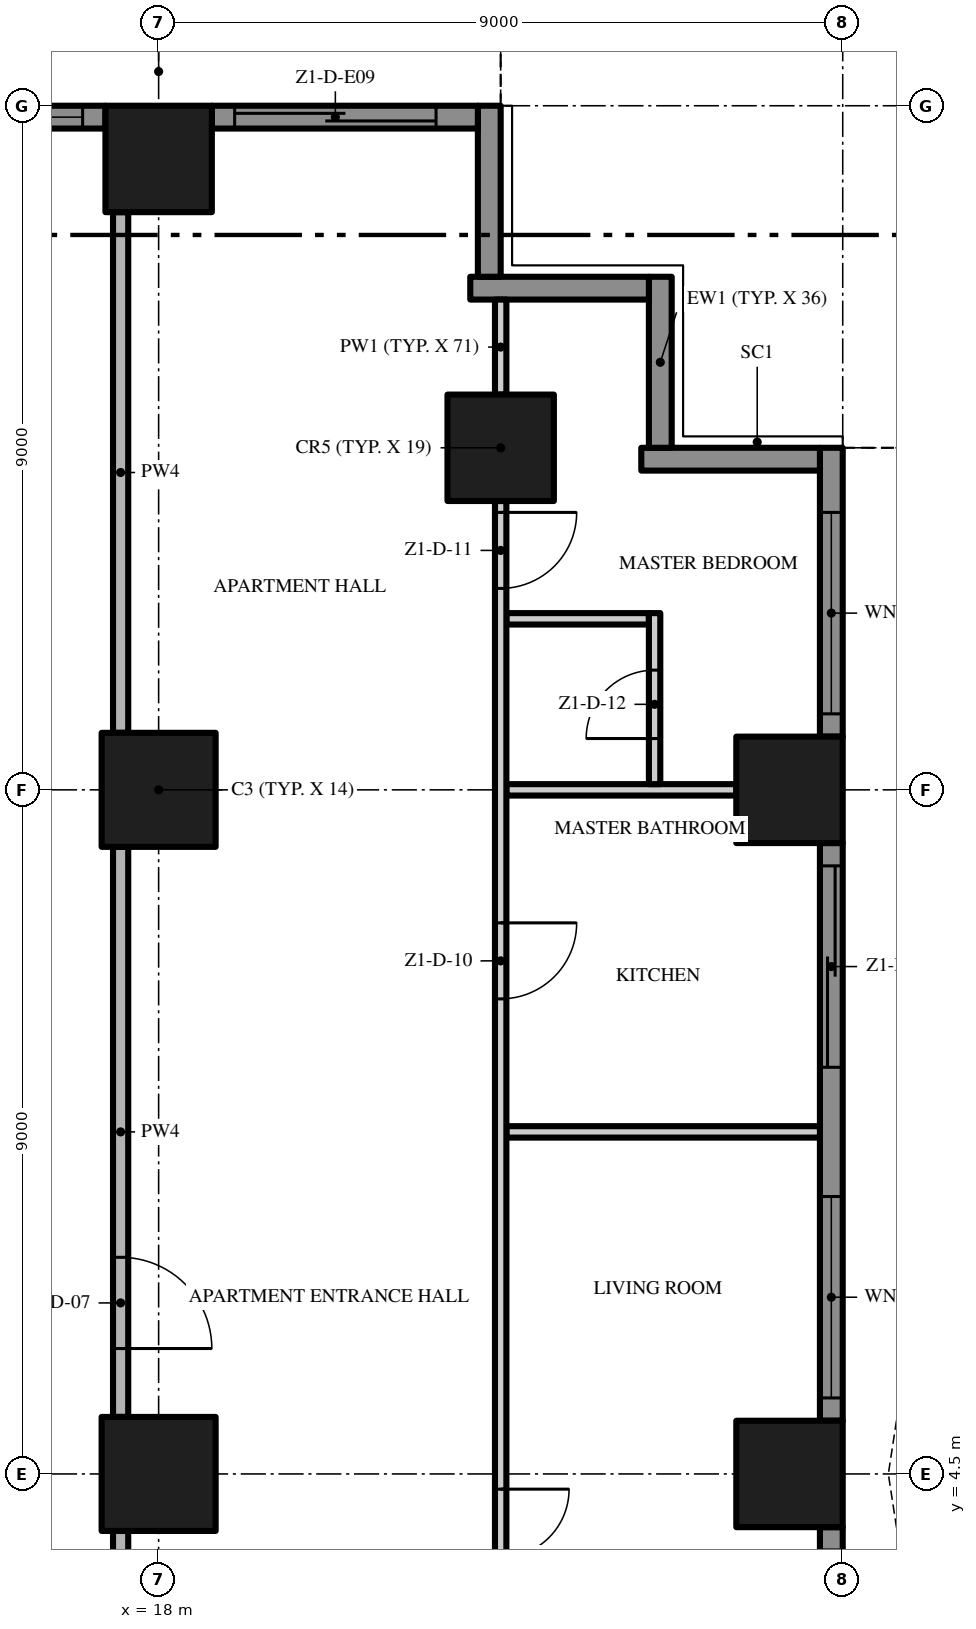
"""IFC4 building model, lengths in metres.
Left out: names, types, materials, properties, quantities, classifications, styles, units other than length and angle.
Written with IfcOpenShell. Run it as: python <this file> out.ifc"""

import sys

from ifc_helpers import new_model, si_unit, direction, frame, frame_2d, origin, origin_2d, place, context, subcontext, project, spatial, polyline, rectangle, outline, extrude, element, fill, save


model = new_model("IFC4")
c1 = context("Model", 3, precision=1e-05, world=origin(), true_north=direction((0.0, 1.0)))
c2 = subcontext(c1, "Body", "Model", "MODEL_VIEW")
j1 = project(units=[si_unit("LENGTHUNIT", "METRE"), si_unit("PLANEANGLEUNIT", "RADIAN")], contexts=[c1])
p1 = place(None, origin())
s1 = spatial("IfcSite", under=j1, at=p1, CompositionType="ELEMENT")
p2 = place(p1, origin())
s2 = spatial("IfcBuilding", under=s1, at=p2, CompositionType="ELEMENT")
p3 = place(p2, frame((0.0, 0.0, 53.0)))
s3 = spatial("IfcBuildingStorey", under=s2, at=p3, CompositionType="ELEMENT", Elevation=53.0)
p4 = place(p3, frame((18.0, 13.5, 0.0), z_axis=(0.0, 0.0, 1.0), x_axis=(1.0, 0.0, 0.0)))
e1 = element("IfcColumn", 1, at=p4, inside=s3, PredefinedType="COLUMN", context=c2, shape_type="SweptSolid", body=[
    extrude(rectangle(XDim=1.5, YDim=1.5, at=origin_2d()), origin(), (0.0, 0.0, 1.0), 3.5),
])
p5 = place(p3, frame((18.0, 21.8, 0.0), z_axis=(0.0, 0.0, 1.0), x_axis=(1.0, 0.0, 0.0)))
e2 = element("IfcColumn", 2, at=p5, inside=s3, PredefinedType="COLUMN", context=c2, shape_type="SweptSolid", body=[
    extrude(rectangle(XDim=1.4, YDim=1.4, at=origin_2d()), origin(), (0.0, 0.0, 1.0), 3.5),
])
p6 = place(p3, frame((18.0, 4.5, 0.0), z_axis=(0.0, 0.0, 1.0), x_axis=(1.0, 0.0, 0.0)))
e3 = element("IfcColumn", 3, at=p6, inside=s3, PredefinedType="COLUMN", context=c2, shape_type="SweptSolid", body=[
    extrude(rectangle(XDim=1.5, YDim=1.5, at=origin_2d()), origin(), (0.0, 0.0, 1.0), 3.5),
])
for number, where, z_axis, x_axis in (
    (4, (26.3, 13.5, 0.0), (0.0, 0.0, 1.0), (1.0, 0.0, 0.0)),
    (5, (22.5, 18.0, 0.0), (0.0, 0.0, 1.0), (1.0, 0.0, 0.0)),
    (6, (26.3, 4.5, 0.0), (0.0, 0.0, 1.0), (1.0, 0.0, 0.0)),
):
    element("IfcColumn", number, at=place(p3, frame(where, z_axis=z_axis, x_axis=x_axis)), inside=s3, PredefinedType="COLUMN", context=c2, shape_type="SweptSolid", body=[
        extrude(rectangle(XDim=1.4, YDim=1.4, at=origin_2d()), origin(), (0.0, 0.0, 1.0), 3.5),
    ])
p7 = place(p3, frame((26.85, 3.8, 0.0), z_axis=(0.0, 0.0, 1.0), x_axis=(0.0, -1.0, 0.0)))
e7 = element("IfcWall", 7, at=p7, inside=s3, PredefinedType="SOLIDWALL", context=c2, shape_type="SweptSolid", body=[
    extrude(rectangle(XDim=7.6, YDim=0.3, at=frame_2d((3.8, 0.0))), origin(), (0.0, 0.0, 1.0), 3.5),
])
p8 = place(p7, frame((4.65, 0.0, 0.0)))
e8 = element("IfcOpeningElement", 8, at=p8, cuts=e7, PredefinedType="OPENING", context=c2, shape_type="SweptSolid", body=[
    extrude(rectangle(XDim=2.65, YDim=2.4, at=frame_2d((1.325, 1.2))), frame((0.0, 0.16, 0.0), z_axis=(0.0, -1.0, 0.0), x_axis=(1.0, 0.0, 0.0)), (0.0, 0.0, 1.0), 0.32),
])
p9 = place(p7, frame((0.3, 0.0, 0.45)))
e9 = element("IfcOpeningElement", 9, at=p9, cuts=e7, PredefinedType="OPENING", context=c2, shape_type="SweptSolid", body=[
    extrude(rectangle(XDim=2.65, YDim=2.65, at=frame_2d((1.325, 1.325))), frame((0.0, 0.16, 0.0), z_axis=(0.0, -1.0, 0.0), x_axis=(1.0, 0.0, 0.0)), (0.0, 0.0, 1.0), 0.32),
])
p10 = place(p3, frame((26.85, 12.8, 0.0), z_axis=(0.0, 0.0, 1.0), x_axis=(0.0, -1.0, 0.0)))
e10 = element("IfcWall", 10, at=p10, inside=s3, PredefinedType="SOLIDWALL", context=c2, shape_type="SweptSolid", body=[
    extrude(rectangle(XDim=7.6, YDim=0.3, at=frame_2d((3.8, 0.0))), origin(), (0.0, 0.0, 1.0), 3.5),
])
p11 = place(p10, frame((4.65, 0.0, 0.45)))
e11 = element("IfcOpeningElement", 11, at=p11, cuts=e10, PredefinedType="OPENING", context=c2, shape_type="SweptSolid", body=[
    extrude(rectangle(XDim=2.65, YDim=2.65, at=frame_2d((1.325, 1.325))), frame((0.0, 0.16, 0.0), z_axis=(0.0, -1.0, 0.0), x_axis=(1.0, 0.0, 0.0)), (0.0, 0.0, 1.0), 0.32),
])
p12 = place(p10, frame((0.3, 0.0, 0.0)))
e12 = element("IfcOpeningElement", 12, at=p12, cuts=e10, PredefinedType="OPENING", context=c2, shape_type="SweptSolid", body=[
    extrude(rectangle(XDim=2.65, YDim=2.4, at=frame_2d((1.325, 1.2))), frame((0.0, 0.16, 0.0), z_axis=(0.0, -1.0, 0.0), x_axis=(1.0, 0.0, 0.0)), (0.0, 0.0, 1.0), 0.32),
])
p13 = place(p3, frame((26.85, 18.0, 0.0), z_axis=(0.0, 0.0, 1.0), x_axis=(0.0, -1.0, 0.0)))
e13 = element("IfcWall", 13, at=p13, inside=s3, PredefinedType="SOLIDWALL", context=c2, shape_type="SweptSolid", body=[
    extrude(rectangle(XDim=3.8, YDim=0.3, at=frame_2d((1.9, 0.0))), origin(), (0.0, 0.0, 1.0), 3.5),
])
p14 = place(p13, frame((0.85, 0.0, 0.45)))
e14 = element("IfcOpeningElement", 14, at=p14, cuts=e13, PredefinedType="OPENING", context=c2, shape_type="SweptSolid", body=[
    extrude(rectangle(XDim=2.65, YDim=2.65, at=frame_2d((1.325, 1.325))), frame((0.0, 0.16, 0.0), z_axis=(0.0, -1.0, 0.0), x_axis=(1.0, 0.0, 0.0)), (0.0, 0.0, 1.0), 0.32),
])
p15 = place(p3, frame((24.35, 17.85, 0.0), z_axis=(0.0, 0.0, 1.0), x_axis=(1.0, 0.0, 0.0)))
e15 = element("IfcWall", 15, at=p15, inside=s3, PredefinedType="SOLIDWALL", context=c2, shape_type="SweptSolid", body=[
    extrude(rectangle(XDim=2.35, YDim=0.3, at=frame_2d((1.175, 0.0))), origin(), (0.0, 0.0, 1.0), 3.5),
])
p16 = place(p3, frame((24.6, 20.25, 0.0), z_axis=(0.0, 0.0, 1.0), x_axis=(0.0, -1.0, 0.0)))
e16 = element("IfcWall", 16, at=p16, inside=s3, PredefinedType="SOLIDWALL", context=c2, shape_type="SweptSolid", body=[
    extrude(rectangle(XDim=2.25, YDim=0.3, at=frame_2d((1.125, 0.0))), origin(), (0.0, 0.0, 1.0), 3.5),
])
p17 = place(p3, frame((22.1, 20.1, 0.0), z_axis=(0.0, 0.0, 1.0), x_axis=(1.0, 0.0, 0.0)))
e17 = element("IfcWall", 17, at=p17, inside=s3, PredefinedType="SOLIDWALL", context=c2, shape_type="SweptSolid", body=[
    extrude(rectangle(XDim=2.35, YDim=0.3, at=frame_2d((1.175, 0.0))), origin(), (0.0, 0.0, 1.0), 3.5),
])
p18 = place(p3, frame((22.35, 22.5, 0.0), z_axis=(0.0, 0.0, 1.0), x_axis=(0.0, -1.0, 0.0)))
e18 = element("IfcWall", 18, at=p18, inside=s3, PredefinedType="SOLIDWALL", context=c2, shape_type="SweptSolid", body=[
    extrude(rectangle(XDim=2.25, YDim=0.3, at=frame_2d((1.125, 0.0))), origin(), (0.0, 0.0, 1.0), 3.5),
])
p19 = place(p3, frame((18.7, 22.35, 0.0), z_axis=(0.0, 0.0, 1.0), x_axis=(1.0, 0.0, 0.0)))
e19 = element("IfcWall", 19, at=p19, inside=s3, PredefinedType="SOLIDWALL", context=c2, shape_type="SweptSolid", body=[
    extrude(rectangle(XDim=3.5, YDim=0.3, at=frame_2d((1.75, 0.0))), origin(), (0.0, 0.0, 1.0), 3.5),
])
p20 = place(p19, frame((0.3, 0.0, 0.0)))
e20 = element("IfcOpeningElement", 20, at=p20, cuts=e19, PredefinedType="OPENING", context=c2, shape_type="SweptSolid", body=[
    extrude(rectangle(XDim=2.65, YDim=2.4, at=frame_2d((1.325, 1.2))), frame((0.0, 0.16, 0.0), z_axis=(0.0, -1.0, 0.0), x_axis=(1.0, 0.0, 0.0)), (0.0, 0.0, 1.0), 0.32),
])
p21 = place(p3, frame((13.5, 22.35, 0.0), z_axis=(0.0, 0.0, 1.0), x_axis=(1.0, 0.0, 0.0)))
e21 = element("IfcWall", 21, at=p21, inside=s3, PredefinedType="SOLIDWALL", context=c2, shape_type="SweptSolid", body=[
    extrude(rectangle(XDim=3.8, YDim=0.3, at=frame_2d((1.9, 0.0))), origin(), (0.0, 0.0, 1.0), 3.5),
])
p22 = place(p21, frame((0.85, 0.0, 0.45)))
e22 = element("IfcOpeningElement", 22, at=p22, cuts=e21, PredefinedType="OPENING", context=c2, shape_type="SweptSolid", body=[
    extrude(rectangle(XDim=2.65, YDim=2.65, at=frame_2d((1.325, 1.325))), frame((0.0, 0.16, 0.0), z_axis=(0.0, -1.0, 0.0), x_axis=(1.0, 0.0, 0.0)), (0.0, 0.0, 1.0), 0.32),
])
p23 = place(p3, origin())
e23 = element("IfcWall", 23, at=p23, inside=s3, PredefinedType="USERDEFINED", context=c2, shape_type="SweptSolid", body=[
    extrude(outline(polyline([(30.0, -18.0), (29.771, -16.5), (29.171, -15.0), (28.429, -13.5), (27.829, -12.0), (27.6, -10.5), (27.829, -9.0), (28.429, -7.5), (29.171, -6.0), (29.771, -4.5), (30.0, -3.0), (29.771, -1.5), (29.171, 0.0), (28.429, 1.5), (27.829, 3.0), (27.6, 4.5), (27.829, 6.0), (28.429, 7.5), (29.171, 9.0), (29.771, 10.5), (30.0, 12.0), (29.771, 13.5), (29.171, 15.0), (28.429, 16.5), (27.829, 18.0), (27.597, 17.907), (28.201, 16.398), (28.942, 14.898), (29.528, 13.434), (29.747, 12.0), (29.528, 10.566), (28.942, 9.102), (28.201, 7.602), (27.586, 6.066), (27.347, 4.5), (27.586, 2.934), (28.201, 1.398), (28.942, -0.102), (29.528, -1.566), (29.747, -3.0), (29.528, -4.434), (28.942, -5.898), (28.201, -7.398), (27.586, -8.934), (27.347, -10.5), (27.586, -12.066), (28.201, -13.602), (28.942, -15.102), (29.528, -16.566), (29.753, -18.038), (30.0, -18.0)])), origin(), (0.0, 0.0, 1.0), 0.9),
])
p24 = place(p3, origin())
e24 = element("IfcWall", 24, at=p24, inside=s3, PredefinedType="USERDEFINED", context=c2, shape_type="SweptSolid", body=[
    extrude(outline(polyline([(22.5, 25.5), (21.0, 25.271), (19.5, 24.671), (18.0, 23.929), (16.5, 23.329), (15.0, 23.1), (13.5, 23.329), (13.462, 23.082), (15.0, 22.847), (16.566, 23.086), (18.102, 23.701), (19.602, 24.442), (21.066, 25.028), (22.538, 25.253), (22.5, 25.5)])), origin(), (0.0, 0.0, 1.0), 0.9),
])
p25 = place(p3, frame((22.575, 9.0, 0.0), z_axis=(0.0, 0.0, 1.0), x_axis=(1.0, 0.0, 0.0)))
e25 = element("IfcWall", 25, at=p25, inside=s3, PredefinedType="PARTITIONING", context=c2, shape_type="SweptSolid", body=[
    extrude(rectangle(XDim=4.125, YDim=0.15, at=frame_2d((2.062, 0.0))), origin(), (0.0, 0.0, 1.0), 3.5),
])
p26 = place(p3, frame((22.575, 13.5, 0.0), z_axis=(0.0, 0.0, 1.0), x_axis=(1.0, 0.0, 0.0)))
e26 = element("IfcWall", 26, at=p26, inside=s3, PredefinedType="PARTITIONING", context=c2, shape_type="SweptSolid", body=[
    extrude(rectangle(XDim=3.025, YDim=0.15, at=frame_2d((1.512, 0.0))), origin(), (0.0, 0.0, 1.0), 3.5),
])
p27 = place(p3, frame((22.575, 15.75, 0.0), z_axis=(0.0, 0.0, 1.0), x_axis=(1.0, 0.0, 0.0)))
e27 = element("IfcWall", 27, at=p27, inside=s3, PredefinedType="PARTITIONING", context=c2, shape_type="SweptSolid", body=[
    extrude(rectangle(XDim=1.875, YDim=0.15, at=frame_2d((0.938, 0.0))), origin(), (0.0, 0.0, 1.0), 3.5),
])
p28 = place(p3, frame((17.5, -0.2, 0.0), z_axis=(0.0, 0.0, 1.0), x_axis=(0.0, 1.0, 0.0)))
e28 = element("IfcWall", 28, at=p28, inside=s3, PredefinedType="PARTITIONING", context=c2, shape_type="SweptSolid", body=[
    extrude(rectangle(XDim=3.95, YDim=0.2, at=frame_2d((1.975, 0.0))), origin(), (0.0, 0.0, 1.0), 3.5),
])
p29 = place(p3, frame((17.5, 12.75, 0.0), z_axis=(0.0, 0.0, 1.0), x_axis=(0.0, -1.0, 0.0)))
e29 = element("IfcWall", 29, at=p29, inside=s3, PredefinedType="PARTITIONING", context=c2, shape_type="SweptSolid", body=[
    extrude(rectangle(XDim=7.5, YDim=0.2, at=frame_2d((3.75, 0.0))), origin(), (0.0, 0.0, 1.0), 3.5),
])
p30 = place(p29, frame((5.4, 0.0, 0.0)))
e30 = element("IfcOpeningElement", 30, at=p30, cuts=e29, PredefinedType="OPENING", context=c2, shape_type="SweptSolid", body=[
    extrude(rectangle(XDim=1.2, YDim=2.4, at=frame_2d((0.6, 1.2))), frame((0.0, 0.11, 0.0), z_axis=(0.0, -1.0, 0.0), x_axis=(1.0, 0.0, 0.0)), (0.0, 0.0, 1.0), 0.22),
])
p31 = place(p3, frame((17.5, 14.25, 0.0), z_axis=(0.0, 0.0, 1.0), x_axis=(0.0, 1.0, 0.0)))
e31 = element("IfcWall", 31, at=p31, inside=s3, PredefinedType="PARTITIONING", context=c2, shape_type="SweptSolid", body=[
    extrude(rectangle(XDim=6.85, YDim=0.2, at=frame_2d((3.425, 0.0))), origin(), (0.0, 0.0, 1.0), 3.5),
])
p32 = place(p3, frame((22.5, 17.3, 0.0), z_axis=(0.0, 0.0, 1.0), x_axis=(0.0, -1.0, 0.0)))
e32 = element("IfcWall", 32, at=p32, inside=s3, PredefinedType="PARTITIONING", context=c2, shape_type="SweptSolid", body=[
    extrude(rectangle(XDim=17.2, YDim=0.15, at=frame_2d((8.6, 0.0))), origin(), (0.0, 0.0, 1.0), 3.5),
])
p33 = place(p32, frame((13.0, 0.0, 0.0)))
e33 = element("IfcOpeningElement", 33, at=p33, cuts=e32, PredefinedType="OPENING", context=c2, shape_type="SweptSolid", body=[
    extrude(rectangle(XDim=1.8, YDim=2.4, at=frame_2d((0.9, 1.2))), frame((0.0, 0.085, 0.0), z_axis=(0.0, -1.0, 0.0), x_axis=(1.0, 0.0, 0.0)), (0.0, 0.0, 1.0), 0.17),
])
p34 = place(p32, frame((5.55, 0.0, 0.0)))
e34 = element("IfcOpeningElement", 34, at=p34, cuts=e32, PredefinedType="OPENING", context=c2, shape_type="SweptSolid", body=[
    extrude(rectangle(XDim=1.0, YDim=2.4, at=frame_2d((0.5, 1.2))), frame((0.0, 0.085, 0.0), z_axis=(0.0, -1.0, 0.0), x_axis=(1.0, 0.0, 0.0)), (0.0, 0.0, 1.0), 0.17),
])
p35 = place(p32, frame((0.15, 0.0, 0.0)))
e35 = element("IfcOpeningElement", 35, at=p35, cuts=e32, PredefinedType="OPENING", context=c2, shape_type="SweptSolid", body=[
    extrude(rectangle(XDim=1.0, YDim=2.4, at=frame_2d((0.5, 1.2))), frame((0.0, 0.085, 0.0), z_axis=(0.0, -1.0, 0.0), x_axis=(1.0, 0.0, 0.0)), (0.0, 0.0, 1.0), 0.17),
])
p36 = place(p3, frame((22.5, 18.7, 0.0), z_axis=(0.0, 0.0, 1.0), x_axis=(0.0, 1.0, 0.0)))
e36 = element("IfcWall", 36, at=p36, inside=s3, PredefinedType="PARTITIONING", context=c2, shape_type="SweptSolid", body=[
    extrude(rectangle(XDim=1.25, YDim=0.15, at=frame_2d((0.625, 0.0))), origin(), (0.0, 0.0, 1.0), 3.5),
])
p37 = place(p3, frame((24.525, 13.575, 0.0), z_axis=(0.0, 0.0, 1.0), x_axis=(0.0, 1.0, 0.0)))
e37 = element("IfcWall", 37, at=p37, inside=s3, PredefinedType="PARTITIONING", context=c2, shape_type="SweptSolid", body=[
    extrude(rectangle(XDim=2.25, YDim=0.15, at=frame_2d((1.125, 0.0))), origin(), (0.0, 0.0, 1.0), 3.5),
])
p38 = place(p37, frame((0.6, 0.0, 0.0)))
e38 = element("IfcOpeningElement", 38, at=p38, cuts=e37, PredefinedType="OPENING", context=c2, shape_type="SweptSolid", body=[
    extrude(rectangle(XDim=0.9, YDim=2.1, at=frame_2d((0.45, 1.05))), frame((0.0, 0.085, 0.0), z_axis=(0.0, -1.0, 0.0), x_axis=(1.0, 0.0, 0.0)), (0.0, 0.0, 1.0), 0.17),
])
p39 = place(p11, origin())
e39 = element("IfcWindow", 39, at=p39, inside=s3, PartitioningType="SINGLE_PANEL", PredefinedType="WINDOW", context=c2, shape_type="SweptSolid", body=[
    extrude(rectangle(XDim=2.65, YDim=2.65, at=frame_2d((1.325, 1.325))), frame((0.0, 0.03, 0.0), z_axis=(0.0, -1.0, 0.0), x_axis=(1.0, 0.0, 0.0)), (0.0, 0.0, 1.0), 0.06),
])
fill(e11, e39)
p40 = place(p12, origin())
e40 = element("IfcDoor", 40, at=p40, inside=s3, OperationType="SINGLE_SWING_LEFT", PredefinedType="DOOR", context=c2, shape_type="SweptSolid", body=[
    extrude(rectangle(XDim=2.65, YDim=2.4, at=frame_2d((1.325, 1.2))), frame((0.0, 0.025, 0.0), z_axis=(0.0, -1.0, 0.0), x_axis=(1.0, 0.0, 0.0)), (0.0, 0.0, 1.0), 0.05),
])
fill(e12, e40)
p41 = place(p14, origin())
e41 = element("IfcWindow", 41, at=p41, inside=s3, PartitioningType="SINGLE_PANEL", PredefinedType="WINDOW", context=c2, shape_type="SweptSolid", body=[
    extrude(rectangle(XDim=2.65, YDim=2.65, at=frame_2d((1.325, 1.325))), frame((0.0, 0.03, 0.0), z_axis=(0.0, -1.0, 0.0), x_axis=(1.0, 0.0, 0.0)), (0.0, 0.0, 1.0), 0.06),
])
fill(e14, e41)
p42 = place(p20, origin())
e42 = element("IfcDoor", 42, at=p42, inside=s3, OperationType="SINGLE_SWING_LEFT", PredefinedType="DOOR", context=c2, shape_type="SweptSolid", body=[
    extrude(rectangle(XDim=2.65, YDim=2.4, at=frame_2d((1.325, 1.2))), frame((0.0, 0.025, 0.0), z_axis=(0.0, -1.0, 0.0), x_axis=(1.0, 0.0, 0.0)), (0.0, 0.0, 1.0), 0.05),
])
fill(e20, e42)
p43 = place(p22, origin())
e43 = element("IfcWindow", 43, at=p43, inside=s3, PartitioningType="SINGLE_PANEL", PredefinedType="WINDOW", context=c2, shape_type="SweptSolid", body=[
    extrude(rectangle(XDim=2.65, YDim=2.65, at=frame_2d((1.325, 1.325))), frame((0.0, 0.03, 0.0), z_axis=(0.0, -1.0, 0.0), x_axis=(1.0, 0.0, 0.0)), (0.0, 0.0, 1.0), 0.06),
])
fill(e22, e43)
p44 = place(p30, origin())
e44 = element("IfcDoor", 44, at=p44, inside=s3, OperationType="SINGLE_SWING_RIGHT", PredefinedType="DOOR", context=c2, shape_type="SweptSolid", body=[
    extrude(rectangle(XDim=1.2, YDim=2.4, at=frame_2d((0.6, 1.2))), frame((0.0, 0.025, 0.0), z_axis=(0.0, -1.0, 0.0), x_axis=(1.0, 0.0, 0.0)), (0.0, 0.0, 1.0), 0.05),
])
fill(e30, e44)
p45 = place(p33, origin())
e45 = element("IfcDoor", 45, at=p45, inside=s3, OperationType="DOUBLE_DOOR_SINGLE_SWING", PredefinedType="DOOR", context=c2, shape_type="SweptSolid", body=[
    extrude(rectangle(XDim=1.8, YDim=2.4, at=frame_2d((0.9, 1.2))), frame((0.0, 0.025, 0.0), z_axis=(0.0, -1.0, 0.0), x_axis=(1.0, 0.0, 0.0)), (0.0, 0.0, 1.0), 0.05),
])
fill(e33, e45)
p46 = place(p34, origin())
e46 = element("IfcDoor", 46, at=p46, inside=s3, OperationType="SINGLE_SWING_LEFT", PredefinedType="DOOR", context=c2, shape_type="SweptSolid", body=[
    extrude(rectangle(XDim=1.0, YDim=2.4, at=frame_2d((0.5, 1.2))), frame((0.0, 0.025, 0.0), z_axis=(0.0, -1.0, 0.0), x_axis=(1.0, 0.0, 0.0)), (0.0, 0.0, 1.0), 0.05),
])
fill(e34, e46)
p47 = place(p35, origin())
e47 = element("IfcDoor", 47, at=p47, inside=s3, OperationType="SINGLE_SWING_LEFT", PredefinedType="DOOR", context=c2, shape_type="SweptSolid", body=[
    extrude(rectangle(XDim=1.0, YDim=2.4, at=frame_2d((0.5, 1.2))), frame((0.0, 0.025, 0.0), z_axis=(0.0, -1.0, 0.0), x_axis=(1.0, 0.0, 0.0)), (0.0, 0.0, 1.0), 0.05),
])
fill(e35, e47)
p48 = place(p38, origin())
e48 = element("IfcDoor", 48, at=p48, inside=s3, OperationType="SINGLE_SWING_LEFT", PredefinedType="DOOR", context=c2, shape_type="SweptSolid", body=[
    extrude(rectangle(XDim=0.9, YDim=2.1, at=frame_2d((0.45, 1.05))), frame((0.0, 0.025, 0.0), z_axis=(0.0, -1.0, 0.0), x_axis=(1.0, 0.0, 0.0)), (0.0, 0.0, 1.0), 0.05),
])
fill(e38, e48)
save(model, sys.argv[1])
